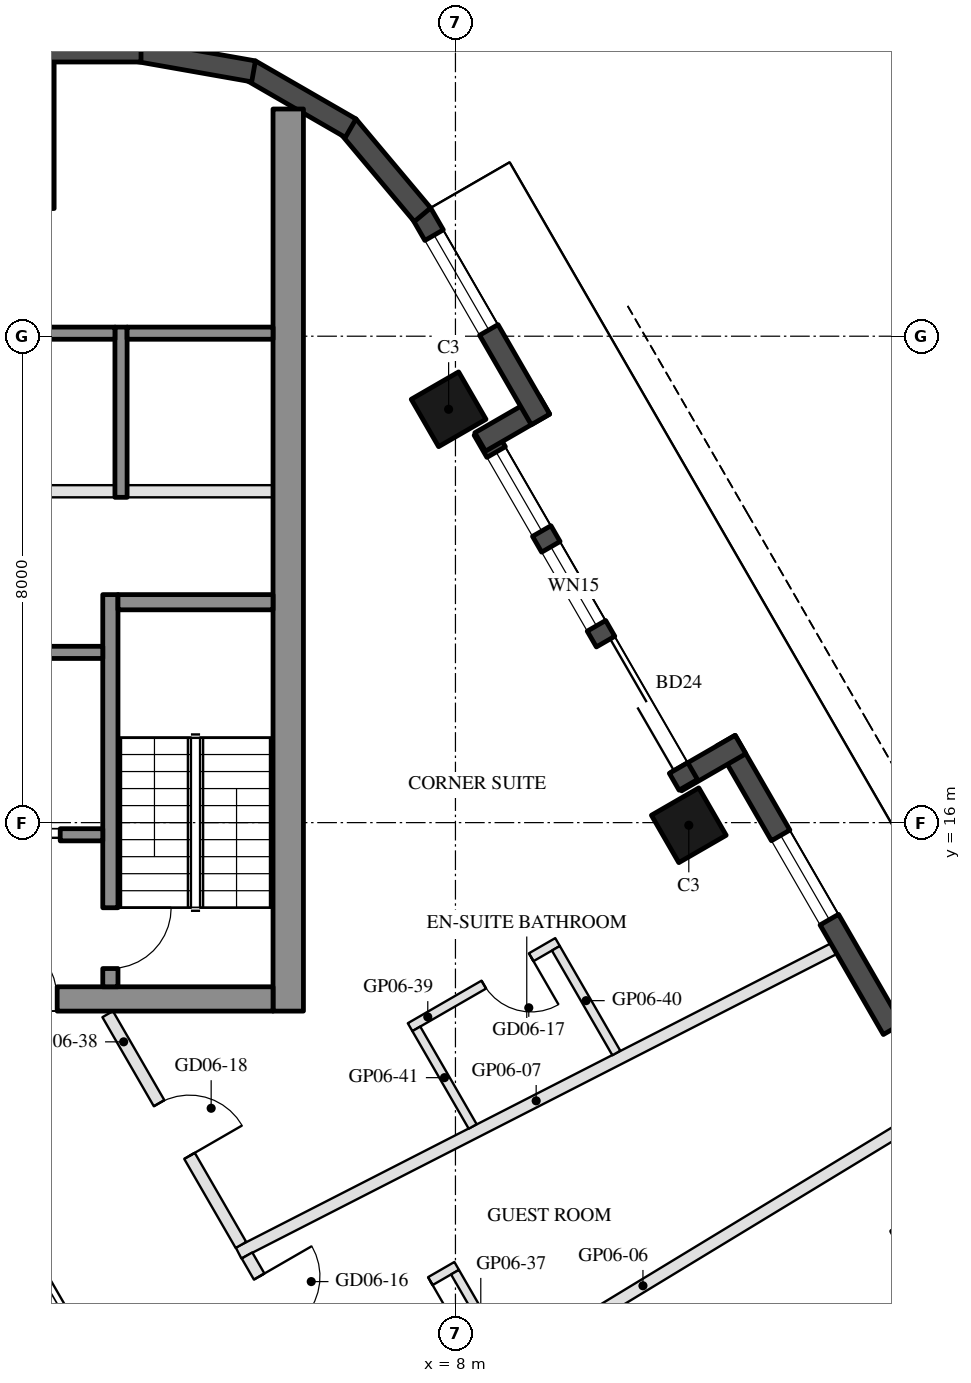
"""IFC4 building model, lengths in metres.
Left out: names, types, materials, properties, quantities, classifications, styles, units other than length and angle.
Written with IfcOpenShell. Run it as: python <this file> out.ifc"""

import sys

from ifc_helpers import new_model, si_unit, direction, frame, frame_2d, origin, origin_2d, place, context, subcontext, project, spatial, rectangle, hollow_rectangle, extrude, element, fill, save


model = new_model("IFC4")
c1 = context("Model", 3, precision=1e-05, world=origin(), true_north=direction((0.0, 1.0)))
c2 = subcontext(c1, "Body", "Model", "MODEL_VIEW")
j1 = project(units=[si_unit("LENGTHUNIT", "METRE"), si_unit("PLANEANGLEUNIT", "RADIAN")], contexts=[c1])
p1 = place(None, origin())
s1 = spatial("IfcSite", under=j1, at=p1, CompositionType="ELEMENT")
p2 = place(p1, origin())
s2 = spatial("IfcBuilding", under=s1, at=p2, CompositionType="ELEMENT")
p3 = place(p2, frame((0.0, 0.0, 87.2)))
s3 = spatial("IfcBuildingStorey", under=s2, at=p3, CompositionType="ELEMENT", Elevation=87.2)
for number, where, z_axis, x_axis in (
    (1, (11.838, 15.957, 0.0), (0.0, 0.0, 1.0), (-0.5, 0.866, 0.0)),
    (2, (7.888, 22.798, 0.0), (0.0, 0.0, 1.0), (-0.5, 0.866, 0.0)),
):
    element("IfcColumn", number, at=place(p3, frame(where, z_axis=z_axis, x_axis=x_axis)), inside=s3, PredefinedType="COLUMN", context=c2, shape_type="SweptSolid", body=[
        extrude(hollow_rectangle(XDim=0.9, YDim=0.9, WallThickness=0.04, at=origin_2d()), origin(), (0.0, 0.0, 1.0), 3.7),
    ])
p4 = place(p3, frame((0.0, 27.3, 0.0), z_axis=(0.0, 0.0, 1.0), x_axis=(1.0, 0.0, 0.0)))
e3 = element("IfcColumn", 3, at=p4, inside=s3, PredefinedType="COLUMN", context=c2, shape_type="SweptSolid", body=[
    extrude(hollow_rectangle(XDim=2.8, YDim=2.4, WallThickness=0.07, at=origin_2d()), origin(), (0.0, 0.0, 1.0), 3.7),
])
p5 = place(p3, frame((17.299, 8.948, 0.0), z_axis=(0.0, 0.0, 1.0), x_axis=(-0.500010041276, 0.866019606374, 0.0)))
e4 = element("IfcWall", 4, at=p5, inside=s3, PredefinedType="SOLIDWALL", context=c2, shape_type="SweptSolid", body=[
    extrude(rectangle(XDim=9.7, YDim=0.35, at=frame_2d((4.85, 0.0))), origin(), (0.0, 0.0, 1.0), 3.55),
])
p6 = place(p5, frame((3.22, 0.0, 0.0)))
e5 = element("IfcOpeningElement", 5, at=p6, cuts=e4, PredefinedType="OPENING", context=c2, shape_type="SweptSolid", body=[
    extrude(rectangle(XDim=1.0, YDim=2.4, at=frame_2d((0.5, 1.2))), frame((0.0, 0.185, 0.0), z_axis=(0.0, -1.0, 0.0), x_axis=(1.0, 0.0, 0.0)), (0.0, 0.0, 1.0), 0.37),
])
p7 = place(p5, frame((6.3, 0.0, 0.3)))
e6 = element("IfcOpeningElement", 6, at=p7, cuts=e4, PredefinedType="OPENING", context=c2, shape_type="SweptSolid", body=[
    extrude(rectangle(XDim=1.6, YDim=2.65, at=frame_2d((0.8, 1.325))), frame((0.0, 0.185, 0.0), z_axis=(0.0, -1.0, 0.0), x_axis=(1.0, 0.0, 0.0)), (0.0, 0.0, 1.0), 0.37),
])
p8 = place(p3, frame((12.688, 17.284, 0.0), z_axis=(0.0, 0.0, 1.0), x_axis=(-0.865955602162, -0.500120880472, 0.0)))
e7 = element("IfcWall", 7, at=p8, inside=s3, PredefinedType="SOLIDWALL", context=c2, shape_type="SweptSolid", body=[
    extrude(rectangle(XDim=1.22, YDim=0.35, at=frame_2d((0.61, 0.0))), origin(), (0.0, 0.0, 1.0), 3.55),
])
p9 = place(p3, frame((11.829, 16.621, 0.0), z_axis=(0.0, 0.0, 1.0), x_axis=(-0.500003597184, 0.866023326939, 0.0)))
e8 = element("IfcWall", 8, at=p9, inside=s3, PredefinedType="SOLIDWALL", context=c2, shape_type="SweptSolid", body=[
    extrude(rectangle(XDim=6.74, YDim=0.35, at=frame_2d((3.37, 0.0))), origin(), (0.0, 0.0, 1.0), 3.55),
])
p10 = place(p9, frame((0.32, 0.0, 0.0)))
e9 = element("IfcOpeningElement", 9, at=p10, cuts=e8, PredefinedType="OPENING", context=c2, shape_type="SweptSolid", body=[
    extrude(rectangle(XDim=2.4, YDim=2.4, at=frame_2d((1.2, 1.2))), frame((0.0, 0.185, 0.0), z_axis=(0.0, -1.0, 0.0), x_axis=(1.0, 0.0, 0.0)), (0.0, 0.0, 1.0), 0.37),
])
p11 = place(p9, frame((3.02, 0.0, 0.3)))
e10 = element("IfcOpeningElement", 10, at=p11, cuts=e8, PredefinedType="OPENING", context=c2, shape_type="SweptSolid", body=[
    extrude(rectangle(XDim=1.5, YDim=2.65, at=frame_2d((0.75, 1.325))), frame((0.0, 0.185, 0.0), z_axis=(0.0, -1.0, 0.0), x_axis=(1.0, 0.0, 0.0)), (0.0, 0.0, 1.0), 0.37),
])
p12 = place(p9, frame((4.82, 0.0, 0.3)))
e11 = element("IfcOpeningElement", 11, at=p12, cuts=e8, PredefinedType="OPENING", context=c2, shape_type="SweptSolid", body=[
    extrude(rectangle(XDim=1.5, YDim=2.65, at=frame_2d((0.75, 1.325))), frame((0.0, 0.185, 0.0), z_axis=(0.0, -1.0, 0.0), x_axis=(1.0, 0.0, 0.0)), (0.0, 0.0, 1.0), 0.37),
])
p13 = place(p3, frame((8.406, 22.26, 0.0), z_axis=(0.0, 0.0, 1.0), x_axis=(0.865955602162, 0.500120880472, 0.0)))
e12 = element("IfcWall", 12, at=p13, inside=s3, PredefinedType="SOLIDWALL", context=c2, shape_type="SweptSolid", body=[
    extrude(rectangle(XDim=1.22, YDim=0.35, at=frame_2d((0.61, 0.0))), origin(), (0.0, 0.0, 1.0), 3.55),
])
p14 = place(p3, frame((9.398, 22.631, 0.0), z_axis=(0.0, 0.0, 1.0), x_axis=(-0.499954521343, 0.866051659307, 0.0)))
e13 = element("IfcWall", 13, at=p14, inside=s3, PredefinedType="SOLIDWALL", context=c2, shape_type="SweptSolid", body=[
    extrude(rectangle(XDim=3.916, YDim=0.35, at=frame_2d((1.958, 0.0))), origin(), (0.0, 0.0, 1.0), 3.55),
])
p15 = place(p14, frame((1.7, 0.0, 0.3)))
e14 = element("IfcOpeningElement", 14, at=p15, cuts=e13, PredefinedType="OPENING", context=c2, shape_type="SweptSolid", body=[
    extrude(rectangle(XDim=1.8, YDim=2.65, at=frame_2d((0.9, 1.325))), frame((0.0, 0.185, 0.0), z_axis=(0.0, -1.0, 0.0), x_axis=(1.0, 0.0, 0.0)), (0.0, 0.0, 1.0), 0.37),
])
p16 = place(p3, frame((7.458, 25.998, 0.0), z_axis=(0.0, 0.0, 1.0), x_axis=(-0.642808304945, 0.766027077259, 0.0)))
e15 = element("IfcWall", 15, at=p16, inside=s3, PredefinedType="SOLIDWALL", context=c2, shape_type="SweptSolid", body=[
    extrude(rectangle(XDim=1.91, YDim=0.35, at=frame_2d((0.955, 0.0))), origin(), (0.0, 0.0, 1.0), 3.55),
])
for number, where, z_axis, x_axis in (
    (16, (6.277, 27.422, 0.0), (0.0, 0.0, 1.0), (-0.866, 0.5, 0.0)),
    (17, (4.68, 28.356, 0.0), (0.0, 0.0, 1.0), (-0.985, 0.174, 0.0)),
):
    element("IfcWall", number, at=place(p3, frame(where, z_axis=z_axis, x_axis=x_axis)), inside=s3, PredefinedType="SOLIDWALL", context=c2, shape_type="SweptSolid", body=[
        extrude(rectangle(XDim=1.91, YDim=0.35, at=frame_2d((0.955, 0.0))), origin(), (0.0, 0.0, 1.0), 3.55),
    ])
p17 = place(p3, frame((2.829, 28.685, 0.0), z_axis=(0.0, 0.0, 1.0), x_axis=(-1.0, 0.0, 0.0)))
e18 = element("IfcWall", 18, at=p17, inside=s3, PredefinedType="SOLIDWALL", context=c2, shape_type="SweptSolid", body=[
    extrude(rectangle(XDim=5.658, YDim=0.35, at=frame_2d((2.829, 0.0))), origin(), (0.0, 0.0, 1.0), 3.55),
])
p18 = place(p3, frame((5.25, 12.9, 0.0), z_axis=(0.0, 0.0, 1.0), x_axis=(0.0, 1.0, 0.0)))
e19 = element("IfcWall", 19, at=p18, inside=s3, PredefinedType="SHEAR", context=c2, shape_type="SweptSolid", body=[
    extrude(rectangle(XDim=14.837, YDim=0.5, at=frame_2d((7.418, 0.0))), origin(), (0.0, 0.0, 1.0), 3.5),
])
p19 = place(p3, frame((5.0, 13.1, 0.0), z_axis=(0.0, 0.0, 1.0), x_axis=(-1.0, 0.0, 0.0)))
e20 = element("IfcWall", 20, at=p19, inside=s3, PredefinedType="SHEAR", context=c2, shape_type="SweptSolid", body=[
    extrude(rectangle(XDim=10.0, YDim=0.4, at=frame_2d((5.0, 0.0))), origin(), (0.0, 0.0, 1.0), 3.5),
])
p20 = place(p19, frame((3.55, 0.0, 0.0)))
e21 = element("IfcOpeningElement", 21, at=p20, cuts=e20, PredefinedType="OPENING", context=c2, shape_type="SweptSolid", body=[
    extrude(rectangle(XDim=1.1, YDim=2.1, at=frame_2d((0.55, 1.05))), frame((0.0, 0.21, 0.0), z_axis=(0.0, -1.0, 0.0), x_axis=(1.0, 0.0, 0.0)), (0.0, 0.0, 1.0), 0.42),
])
p21 = place(p19, frame((5.85, 0.0, 0.0)))
e22 = element("IfcOpeningElement", 22, at=p21, cuts=e20, PredefinedType="OPENING", context=c2, shape_type="SweptSolid", body=[
    extrude(rectangle(XDim=1.4, YDim=2.1, at=frame_2d((0.7, 1.05))), frame((0.0, 0.21, 0.0), z_axis=(0.0, -1.0, 0.0), x_axis=(1.0, 0.0, 0.0)), (0.0, 0.0, 1.0), 0.42),
])
p22 = place(p3, frame((2.325, 13.3, 0.0), z_axis=(0.0, 0.0, 1.0), x_axis=(0.0, 1.0, 0.0)))
e23 = element("IfcWall", 23, at=p22, inside=s3, PredefinedType="SHEAR", context=c2, shape_type="SweptSolid", body=[
    extrude(rectangle(XDim=6.45, YDim=0.25, at=frame_2d((3.225, 0.0))), origin(), (0.0, 0.0, 1.0), 3.5),
])
p23 = place(p22, frame((0.3, 0.0, 0.0)))
e24 = element("IfcOpeningElement", 24, at=p23, cuts=e23, PredefinedType="OPENING", context=c2, shape_type="SweptSolid", body=[
    extrude(rectangle(XDim=1.0, YDim=2.1, at=frame_2d((0.5, 1.05))), frame((0.0, 0.135, 0.0), z_axis=(0.0, -1.0, 0.0), x_axis=(1.0, 0.0, 0.0)), (0.0, 0.0, 1.0), 0.27),
])
p24 = place(p3, frame((5.0, 19.625, 0.0), z_axis=(0.0, 0.0, 1.0), x_axis=(-1.0, 0.0, 0.0)))
e25 = element("IfcWall", 25, at=p24, inside=s3, PredefinedType="SHEAR", context=c2, shape_type="SweptSolid", body=[
    extrude(rectangle(XDim=2.55, YDim=0.25, at=frame_2d((1.275, 0.0))), origin(), (0.0, 0.0, 1.0), 3.5),
])
p25 = place(p3, frame((2.2, 18.8, 0.0), z_axis=(0.0, 0.0, 1.0), x_axis=(-1.0, 0.0, 0.0)))
e26 = element("IfcWall", 26, at=p25, inside=s3, PredefinedType="SHEAR", context=c2, shape_type="SweptSolid", body=[
    extrude(rectangle(XDim=2.8, YDim=0.2, at=frame_2d((1.4, 0.0))), origin(), (0.0, 0.0, 1.0), 3.5),
])
p26 = place(p3, frame((2.2, 15.8, 0.0), z_axis=(0.0, 0.0, 1.0), x_axis=(-1.0, 0.0, 0.0)))
e27 = element("IfcWall", 27, at=p26, inside=s3, PredefinedType="SHEAR", context=c2, shape_type="SweptSolid", body=[
    extrude(rectangle(XDim=2.8, YDim=0.2, at=frame_2d((1.4, 0.0))), origin(), (0.0, 0.0, 1.0), 3.5),
])
p27 = place(p26, frame((0.7, 0.0, 0.0)))
e28 = element("IfcOpeningElement", 28, at=p27, cuts=e27, PredefinedType="OPENING", context=c2, shape_type="SweptSolid", body=[
    extrude(rectangle(XDim=1.2, YDim=2.1, at=frame_2d((0.6, 1.05))), frame((0.0, 0.11, 0.0), z_axis=(0.0, -1.0, 0.0), x_axis=(1.0, 0.0, 0.0)), (0.0, 0.0, 1.0), 0.22),
])
p28 = place(p3, frame((2.5, 21.35, 0.0), z_axis=(0.0, 0.0, 1.0), x_axis=(0.0, 1.0, 0.0)))
e29 = element("IfcWall", 29, at=p28, inside=s3, PredefinedType="SHEAR", context=c2, shape_type="SweptSolid", body=[
    extrude(rectangle(XDim=2.8, YDim=0.2, at=frame_2d((1.4, 0.0))), origin(), (0.0, 0.0, 1.0), 3.5),
])
p29 = place(p3, frame((5.0, 24.05, 0.0), z_axis=(0.0, 0.0, 1.0), x_axis=(-1.0, 0.0, 0.0)))
e30 = element("IfcWall", 30, at=p29, inside=s3, PredefinedType="SHEAR", context=c2, shape_type="SweptSolid", body=[
    extrude(rectangle(XDim=2.4, YDim=0.2, at=frame_2d((1.2, 0.0))), origin(), (0.0, 0.0, 1.0), 3.5),
])
p30 = place(p3, frame((2.4, 24.05, 0.0), z_axis=(0.0, 0.0, 1.0), x_axis=(-1.0, 0.0, 0.0)))
e31 = element("IfcWall", 31, at=p30, inside=s3, PredefinedType="SHEAR", context=c2, shape_type="SweptSolid", body=[
    extrude(rectangle(XDim=2.8, YDim=0.2, at=frame_2d((1.4, 0.0))), origin(), (0.0, 0.0, 1.0), 3.5),
])
p31 = place(p3, frame((5.0, 21.45, 0.0), z_axis=(0.0, 0.0, 1.0), x_axis=(-1.0, 0.0, 0.0)))
e32 = element("IfcWall", 32, at=p31, inside=s3, PredefinedType="PARTITIONING", context=c2, shape_type="SweptSolid", body=[
    extrude(rectangle(XDim=2.4, YDim=0.2, at=frame_2d((1.2, 0.0))), origin(), (0.0, 0.0, 1.0), 3.5),
])
p32 = place(p3, frame((2.4, 21.45, 0.0), z_axis=(0.0, 0.0, 1.0), x_axis=(-1.0, 0.0, 0.0)))
e33 = element("IfcWall", 33, at=p32, inside=s3, PredefinedType="PARTITIONING", context=c2, shape_type="SweptSolid", body=[
    extrude(rectangle(XDim=2.8, YDim=0.2, at=frame_2d((1.4, 0.0))), origin(), (0.0, 0.0, 1.0), 3.5),
])
p33 = place(p3, frame((15.777, 11.233, 0.0), z_axis=(0.0, 0.0, 1.0), x_axis=(-0.854689239939, -0.519139964877, 0.0)))
e34 = element("IfcWall", 34, at=p33, inside=s3, PredefinedType="PARTITIONING", context=c2, shape_type="SweptSolid", body=[
    extrude(rectangle(XDim=10.983, YDim=0.2, at=frame_2d((5.491, 0.0))), origin(), (0.0, 0.0, 1.0), 2.96),
])
p34 = place(p3, frame((14.222, 13.927, 0.0), z_axis=(0.0, 0.0, 1.0), x_axis=(-0.890385282198, -0.455207699017, 0.0)))
e35 = element("IfcWall", 35, at=p34, inside=s3, PredefinedType="PARTITIONING", context=c2, shape_type="SweptSolid", body=[
    extrude(rectangle(XDim=10.994, YDim=0.2, at=frame_2d((5.497, 0.0))), origin(), (0.0, 0.0, 1.0), 2.96),
])
p35 = place(p3, frame((4.572, 8.881, 0.0), z_axis=(0.0, 0.0, 1.0), x_axis=(0.500041684057, -0.866001336145, 0.0)))
e36 = element("IfcWall", 36, at=p35, inside=s3, PredefinedType="PARTITIONING", context=c2, shape_type="SweptSolid", body=[
    extrude(rectangle(XDim=3.707, YDim=0.2, at=frame_2d((1.854, 0.0))), origin(), (0.0, 0.0, 1.0), 2.95),
])
p36 = place(p35, frame((0.4, 0.0, 0.0)))
e37 = element("IfcOpeningElement", 37, at=p36, cuts=e36, PredefinedType="OPENING", context=c2, shape_type="SweptSolid", body=[
    extrude(rectangle(XDim=1.0, YDim=2.1, at=frame_2d((0.5, 1.05))), frame((0.0, 0.11, 0.0), z_axis=(0.0, -1.0, 0.0), x_axis=(1.0, 0.0, 0.0)), (0.0, 0.0, 1.0), 0.22),
])
p37 = place(p3, frame((8.02, 8.709, 0.0), z_axis=(0.0, 0.0, 1.0), x_axis=(-0.866034573852, -0.49998411664, 0.0)))
e38 = element("IfcWall", 38, at=p37, inside=s3, PredefinedType="PARTITIONING", context=c2, shape_type="SweptSolid", body=[
    extrude(rectangle(XDim=2.8, YDim=0.15, at=frame_2d((1.4, 0.0))), origin(), (0.0, 0.0, 1.0), 3.55),
])
p38 = place(p37, frame((0.5, 0.0, 0.0)))
e39 = element("IfcOpeningElement", 39, at=p38, cuts=e38, PredefinedType="OPENING", context=c2, shape_type="SweptSolid", body=[
    extrude(rectangle(XDim=0.9, YDim=2.1, at=frame_2d((0.45, 1.05))), frame((0.0, 0.085, 0.0), z_axis=(0.0, -1.0, 0.0), x_axis=(1.0, 0.0, 0.0)), (0.0, 0.0, 1.0), 0.17),
])
p39 = place(p3, frame((8.841, 7.137, 0.0), z_axis=(0.0, 0.0, 1.0), x_axis=(-0.500054617923, 0.865993867816, 0.0)))
e40 = element("IfcWall", 40, at=p39, inside=s3, PredefinedType="PARTITIONING", context=c2, shape_type="SweptSolid", body=[
    extrude(rectangle(XDim=1.697, YDim=0.15, at=frame_2d((0.848, 0.0))), origin(), (0.0, 0.0, 1.0), 3.55),
])
p40 = place(p3, frame((2.281, 12.85, 0.0), z_axis=(0.0, 0.0, 1.0), x_axis=(0.499973180286, -0.8660408876, 0.0)))
e41 = element("IfcWall", 41, at=p40, inside=s3, PredefinedType="PARTITIONING", context=c2, shape_type="SweptSolid", body=[
    extrude(rectangle(XDim=4.383, YDim=0.2, at=frame_2d((2.191, 0.0))), origin(), (0.0, 0.0, 1.0), 2.95),
])
p41 = place(p40, frame((1.691, 0.0, 0.0)))
e42 = element("IfcOpeningElement", 42, at=p41, cuts=e41, PredefinedType="OPENING", context=c2, shape_type="SweptSolid", body=[
    extrude(rectangle(XDim=1.0, YDim=2.1, at=frame_2d((0.5, 1.05))), frame((0.0, 0.11, 0.0), z_axis=(0.0, -1.0, 0.0), x_axis=(1.0, 0.0, 0.0)), (0.0, 0.0, 1.0), 0.22),
])
p42 = place(p3, frame((9.679, 14.036, 0.0), z_axis=(0.0, 0.0, 1.0), x_axis=(-0.865996816683, -0.500049511043, 0.0)))
e43 = element("IfcWall", 43, at=p42, inside=s3, PredefinedType="PARTITIONING", context=c2, shape_type="SweptSolid", body=[
    extrude(rectangle(XDim=2.8, YDim=0.15, at=frame_2d((1.4, 0.0))), origin(), (0.0, 0.0, 1.0), 3.55),
])
p43 = place(p42, frame((0.5, 0.0, 0.0)))
e44 = element("IfcOpeningElement", 44, at=p43, cuts=e43, PredefinedType="OPENING", context=c2, shape_type="SweptSolid", body=[
    extrude(rectangle(XDim=0.9, YDim=2.1, at=frame_2d((0.45, 1.05))), frame((0.0, 0.085, 0.0), z_axis=(0.0, -1.0, 0.0), x_axis=(1.0, 0.0, 0.0)), (0.0, 0.0, 1.0), 0.17),
])
p44 = place(p3, frame((10.646, 12.211, 0.0), z_axis=(0.0, 0.0, 1.0), x_axis=(-0.50001992892, 0.866013897511, 0.0)))
e45 = element("IfcWall", 45, at=p44, inside=s3, PredefinedType="PARTITIONING", context=c2, shape_type="SweptSolid", body=[
    extrude(rectangle(XDim=1.989, YDim=0.15, at=frame_2d((0.995, 0.0))), origin(), (0.0, 0.0, 1.0), 3.55),
])
p45 = place(p3, frame((8.283, 11.003, 0.0), z_axis=(0.0, 0.0, 1.0), x_axis=(-0.499935264145, 0.866062775822, 0.0)))
e46 = element("IfcWall", 46, at=p45, inside=s3, PredefinedType="PARTITIONING", context=c2, shape_type="SweptSolid", body=[
    extrude(rectangle(XDim=1.854, YDim=0.15, at=frame_2d((0.927, 0.0))), origin(), (0.0, 0.0, 1.0), 3.55),
])
p46 = place(p6, frame((1.0, 0.0, 0.0), z_axis=(0.0, 0.0, 1.0), x_axis=(-1.0, 0.0, 0.0)))
e47 = element("IfcDoor", 47, at=p46, inside=s3, OperationType="SLIDING_TO_LEFT", PredefinedType="DOOR", context=c2, shape_type="SweptSolid", body=[
    extrude(rectangle(XDim=1.0, YDim=2.4, at=frame_2d((0.5, 1.2))), frame((0.0, 0.025, 0.0), z_axis=(0.0, -1.0, 0.0), x_axis=(1.0, 0.0, 0.0)), (0.0, 0.0, 1.0), 0.05),
])
fill(e5, e47)
p47 = place(p7, origin())
e48 = element("IfcWindow", 48, at=p47, inside=s3, PartitioningType="SINGLE_PANEL", PredefinedType="WINDOW", context=c2, shape_type="SweptSolid", body=[
    extrude(rectangle(XDim=1.6, YDim=2.65, at=frame_2d((0.8, 1.325))), frame((0.0, 0.03, 0.0), z_axis=(0.0, -1.0, 0.0), x_axis=(1.0, 0.0, 0.0)), (0.0, 0.0, 1.0), 0.06),
])
fill(e6, e48)
p48 = place(p10, frame((2.4, 0.0, 0.0), z_axis=(0.0, 0.0, 1.0), x_axis=(-1.0, 0.0, 0.0)))
e49 = element("IfcDoor", 49, at=p48, inside=s3, OperationType="SLIDING_TO_LEFT", PredefinedType="DOOR", context=c2, shape_type="SweptSolid", body=[
    extrude(rectangle(XDim=2.4, YDim=2.4, at=frame_2d((1.2, 1.2))), frame((0.0, 0.025, 0.0), z_axis=(0.0, -1.0, 0.0), x_axis=(1.0, 0.0, 0.0)), (0.0, 0.0, 1.0), 0.05),
])
fill(e9, e49)
p49 = place(p11, origin())
e50 = element("IfcWindow", 50, at=p49, inside=s3, PartitioningType="SINGLE_PANEL", PredefinedType="WINDOW", context=c2, shape_type="SweptSolid", body=[
    extrude(rectangle(XDim=1.5, YDim=2.65, at=frame_2d((0.75, 1.325))), frame((0.0, 0.03, 0.0), z_axis=(0.0, -1.0, 0.0), x_axis=(1.0, 0.0, 0.0)), (0.0, 0.0, 1.0), 0.06),
])
fill(e10, e50)
p50 = place(p12, origin())
e51 = element("IfcWindow", 51, at=p50, inside=s3, PartitioningType="SINGLE_PANEL", PredefinedType="WINDOW", context=c2, shape_type="SweptSolid", body=[
    extrude(rectangle(XDim=1.5, YDim=2.65, at=frame_2d((0.75, 1.325))), frame((0.0, 0.03, 0.0), z_axis=(0.0, -1.0, 0.0), x_axis=(1.0, 0.0, 0.0)), (0.0, 0.0, 1.0), 0.06),
])
fill(e11, e51)
p51 = place(p15, origin())
e52 = element("IfcWindow", 52, at=p51, inside=s3, PartitioningType="SINGLE_PANEL", PredefinedType="WINDOW", context=c2, shape_type="SweptSolid", body=[
    extrude(rectangle(XDim=1.8, YDim=2.65, at=frame_2d((0.9, 1.325))), frame((0.0, 0.03, 0.0), z_axis=(0.0, -1.0, 0.0), x_axis=(1.0, 0.0, 0.0)), (0.0, 0.0, 1.0), 0.06),
])
fill(e14, e52)
p52 = place(p27, origin())
e53 = element("IfcDoor", 53, at=p52, inside=s3, OperationType="DOUBLE_DOOR_SLIDING", PredefinedType="DOOR", context=c2, shape_type="SweptSolid", body=[
    extrude(rectangle(XDim=1.2, YDim=2.1, at=frame_2d((0.6, 1.05))), frame((0.0, 0.025, 0.0), z_axis=(0.0, -1.0, 0.0), x_axis=(1.0, 0.0, 0.0)), (0.0, 0.0, 1.0), 0.05),
])
fill(e28, e53)
p53 = place(p20, frame((1.1, 0.0, 0.0), z_axis=(0.0, 0.0, 1.0), x_axis=(-1.0, 0.0, 0.0)))
e54 = element("IfcDoor", 54, at=p53, inside=s3, OperationType="SINGLE_SWING_LEFT", PredefinedType="DOOR", context=c2, shape_type="SweptSolid", body=[
    extrude(rectangle(XDim=1.1, YDim=2.1, at=frame_2d((0.55, 1.05))), frame((0.0, 0.025, 0.0), z_axis=(0.0, -1.0, 0.0), x_axis=(1.0, 0.0, 0.0)), (0.0, 0.0, 1.0), 0.05),
])
fill(e21, e54)
p54 = place(p23, frame((1.0, 0.0, 0.0), z_axis=(0.0, 0.0, 1.0), x_axis=(-1.0, 0.0, 0.0)))
e55 = element("IfcDoor", 55, at=p54, inside=s3, OperationType="SINGLE_SWING_LEFT", PredefinedType="DOOR", context=c2, shape_type="SweptSolid", body=[
    extrude(rectangle(XDim=1.0, YDim=2.1, at=frame_2d((0.5, 1.05))), frame((0.0, 0.025, 0.0), z_axis=(0.0, -1.0, 0.0), x_axis=(1.0, 0.0, 0.0)), (0.0, 0.0, 1.0), 0.05),
])
fill(e24, e55)
p55 = place(p38, origin())
e56 = element("IfcDoor", 56, at=p55, inside=s3, OperationType="SINGLE_SWING_LEFT", PredefinedType="DOOR", context=c2, shape_type="SweptSolid", body=[
    extrude(rectangle(XDim=0.9, YDim=2.1, at=frame_2d((0.45, 1.05))), frame((0.0, 0.025, 0.0), z_axis=(0.0, -1.0, 0.0), x_axis=(1.0, 0.0, 0.0)), (0.0, 0.0, 1.0), 0.05),
])
fill(e39, e56)
p56 = place(p36, origin())
e57 = element("IfcDoor", 57, at=p56, inside=s3, OperationType="SINGLE_SWING_LEFT", PredefinedType="DOOR", context=c2, shape_type="SweptSolid", body=[
    extrude(rectangle(XDim=1.0, YDim=2.1, at=frame_2d((0.5, 1.05))), frame((0.0, 0.025, 0.0), z_axis=(0.0, -1.0, 0.0), x_axis=(1.0, 0.0, 0.0)), (0.0, 0.0, 1.0), 0.05),
])
fill(e37, e57)
p57 = place(p43, origin())
e58 = element("IfcDoor", 58, at=p57, inside=s3, OperationType="SINGLE_SWING_LEFT", PredefinedType="DOOR", context=c2, shape_type="SweptSolid", body=[
    extrude(rectangle(XDim=0.9, YDim=2.1, at=frame_2d((0.45, 1.05))), frame((0.0, 0.025, 0.0), z_axis=(0.0, -1.0, 0.0), x_axis=(1.0, 0.0, 0.0)), (0.0, 0.0, 1.0), 0.05),
])
fill(e44, e58)
p58 = place(p41, origin())
e59 = element("IfcDoor", 59, at=p58, inside=s3, OperationType="SINGLE_SWING_RIGHT", PredefinedType="DOOR", context=c2, shape_type="SweptSolid", body=[
    extrude(rectangle(XDim=1.0, YDim=2.1, at=frame_2d((0.5, 1.05))), frame((0.0, 0.025, 0.0), z_axis=(0.0, -1.0, 0.0), x_axis=(1.0, 0.0, 0.0)), (0.0, 0.0, 1.0), 0.05),
])
fill(e42, e59)
save(model, sys.argv[1])
